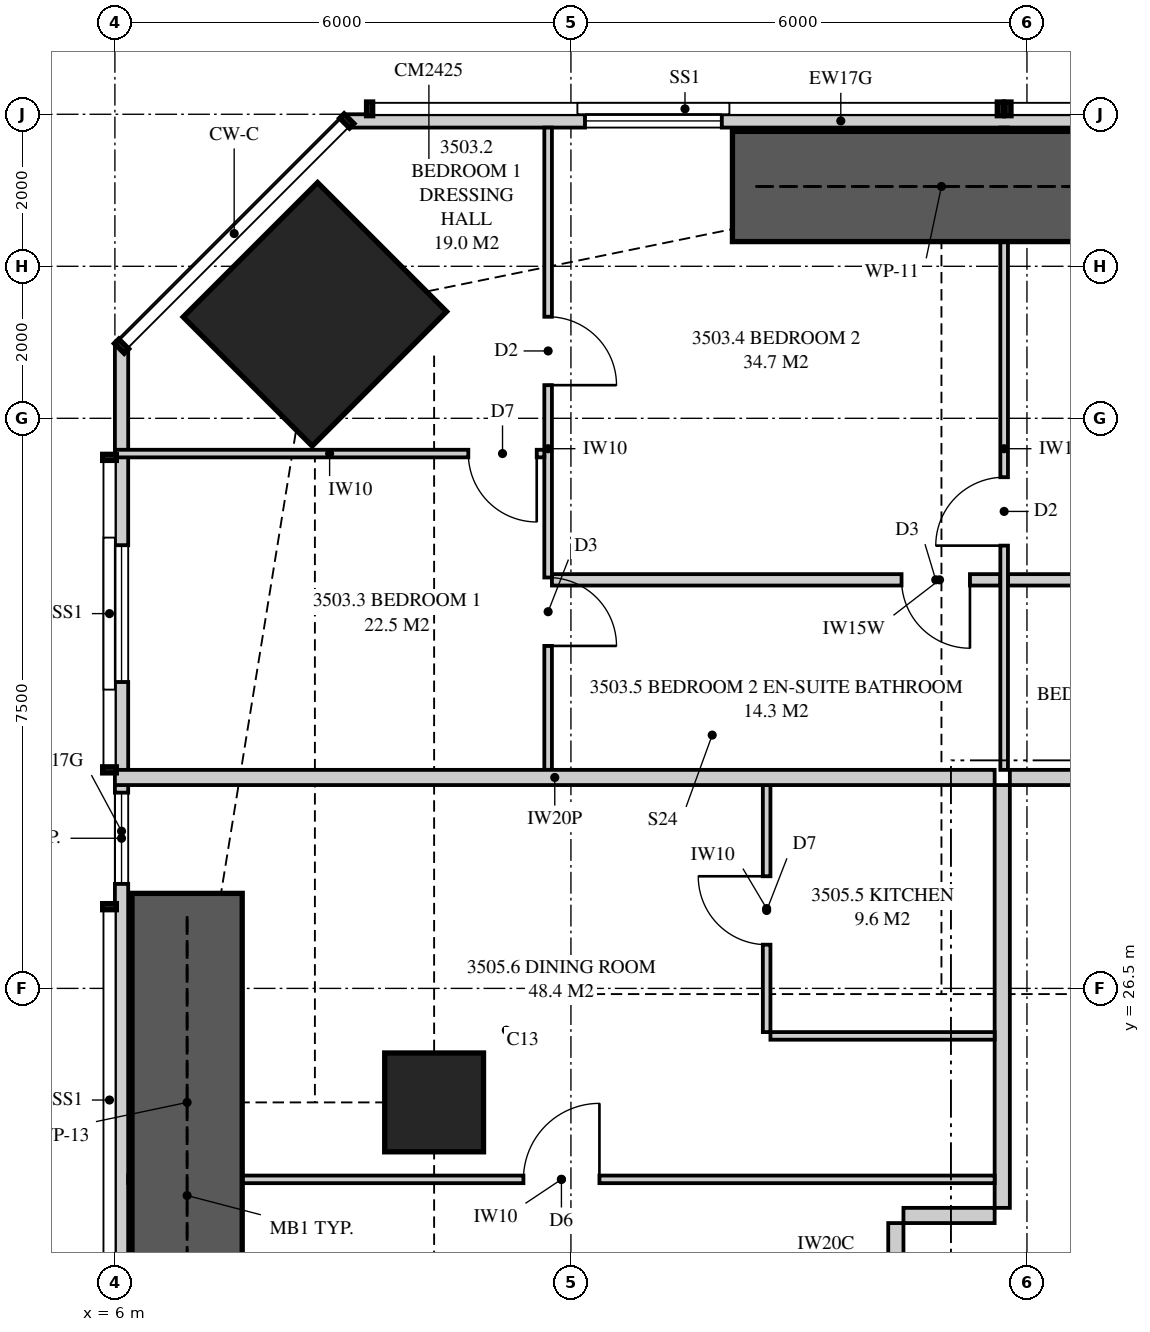
"""IFC4 building model, lengths in metres.
Left out: names, types, materials, properties, quantities, classifications, styles, units other than length and angle.
Written with IfcOpenShell. Run it as: python <this file> out.ifc"""

import sys

from ifc_helpers import new_model, si_unit, direction, frame, frame_2d, origin, origin_2d, place, context, subcontext, project, spatial, polyline, rectangle, outline, extrude, element, fill, save


model = new_model("IFC4")
c1 = context("Model", 3, precision=1e-05, world=origin(), true_north=direction((0.0, 1.0)))
c2 = subcontext(c1, "Body", "Model", "MODEL_VIEW")
j1 = project(units=[si_unit("LENGTHUNIT", "METRE"), si_unit("PLANEANGLEUNIT", "RADIAN")], contexts=[c1])
p1 = place(None, origin())
s1 = spatial("IfcSite", under=j1, at=p1, CompositionType="ELEMENT")
p2 = place(p1, origin())
s2 = spatial("IfcBuilding", under=s1, at=p2, CompositionType="ELEMENT")
p3 = place(p2, frame((0.0, 0.0, 128.3)))
s3 = spatial("IfcBuildingStorey", under=s2, at=p3, CompositionType="ELEMENT", Elevation=128.3)
p4 = place(p3, frame((8.631, 35.369, 0.0), z_axis=(0.0, 0.0, 1.0), x_axis=(0.707106781187, -0.707106781187, 0.0)))
e1 = element("IfcColumn", 1, at=p4, inside=s3, PredefinedType="COLUMN", context=c2, shape_type="SweptSolid", body=[
    extrude(rectangle(XDim=2.4, YDim=2.5, at=origin_2d()), origin(), (0.0, 0.0, 1.0), 3.35),
])
p5 = place(p3, frame((10.2, 25.0, 0.0), z_axis=(0.0, 0.0, 1.0), x_axis=(1.0, 0.0, 0.0)))
e2 = element("IfcColumn", 2, at=p5, inside=s3, PredefinedType="COLUMN", context=c2, shape_type="SweptSolid", body=[
    extrude(rectangle(XDim=1.3, YDim=1.3, at=origin_2d()), origin(), (0.0, 0.0, 1.0), 3.35),
])
p6 = place(p3, frame((22.05, 37.913, 0.0), z_axis=(0.0, 0.0, 1.0), x_axis=(-1.0, 0.0, 0.0)))
e3 = element("IfcWall", 3, at=p6, inside=s3, PredefinedType="SOLIDWALL", context=c2, shape_type="SweptSolid", body=[
    extrude(outline(polyline([(0.0, 0.0), (12.999, 0.0), (12.999, 3.11), (5.378, 3.11), (5.378, 2.15), (5.333, 2.15), (5.333, 3.11), (5.175, 3.11), (5.175, 2.15), (0.0, 2.15), (0.0, 0.0)])), frame((0.0, 0.087, 0.0), z_axis=(0.0, -1.0, 0.0), x_axis=(1.0, 0.0, 0.0)), (0.0, 0.0, 1.0), 0.175),
])
p7 = place(p6, frame((0.492, 0.0, 0.4)))
e4 = element("IfcOpeningElement", 4, at=p7, cuts=e3, PredefinedType="OPENING", context=c2, shape_type="SweptSolid", body=[
    extrude(rectangle(XDim=1.8, YDim=1.7, at=frame_2d((0.9, 0.85))), frame((0.0, 0.097, 0.0), z_axis=(0.0, -1.0, 0.0), x_axis=(1.0, 0.0, 0.0)), (0.0, 0.0, 1.0), 0.195),
])
p8 = place(p6, frame((8.065, 0.0, 0.4)))
e5 = element("IfcOpeningElement", 5, at=p8, cuts=e3, PredefinedType="OPENING", context=c2, shape_type="SweptSolid", body=[
    extrude(rectangle(XDim=1.8, YDim=1.7, at=frame_2d((0.9, 0.85))), frame((0.0, 0.097, 0.0), z_axis=(0.0, -1.0, 0.0), x_axis=(1.0, 0.0, 0.0)), (0.0, 0.0, 1.0), 0.195),
])
p9 = place(p3, frame((6.087, 34.949, 0.0), z_axis=(0.0, 0.0, 1.0), x_axis=(0.0, -1.0, 0.0)))
e6 = element("IfcWall", 6, at=p9, inside=s3, PredefinedType="SOLIDWALL", context=c2, shape_type="SweptSolid", body=[
    extrude(outline(polyline([(0.0, 0.0), (12.761, 0.0), (12.761, 2.15), (9.949, 2.15), (9.949, 3.11), (9.823, 3.11), (9.823, 2.15), (9.73, 2.15), (9.73, 3.11), (0.0, 3.11), (0.0, 0.0)])), frame((0.0, 0.087, 0.0), z_axis=(0.0, -1.0, 0.0), x_axis=(1.0, 0.0, 0.0)), (0.0, 0.0, 1.0), 0.175),
])
p10 = place(p9, frame((2.618, 0.0, 0.4)))
e7 = element("IfcOpeningElement", 7, at=p10, cuts=e6, PredefinedType="OPENING", context=c2, shape_type="SweptSolid", body=[
    extrude(rectangle(XDim=1.8, YDim=1.7, at=frame_2d((0.9, 0.85))), frame((0.0, 0.097, 0.0), z_axis=(0.0, -1.0, 0.0), x_axis=(1.0, 0.0, 0.0)), (0.0, 0.0, 1.0), 0.195),
])
p11 = place(p9, frame((5.874, 0.0, 0.4)))
e8 = element("IfcOpeningElement", 8, at=p11, cuts=e6, PredefinedType="OPENING", context=c2, shape_type="SweptSolid", body=[
    extrude(rectangle(XDim=1.2, YDim=1.7, at=frame_2d((0.6, 0.85))), frame((0.0, 0.097, 0.0), z_axis=(0.0, -1.0, 0.0), x_axis=(1.0, 0.0, 0.0)), (0.0, 0.0, 1.0), 0.195),
])
p12 = place(p3, frame((17.775, 29.275, 0.0), z_axis=(0.0, 0.0, 1.0), x_axis=(1.0, 0.0, 0.0)))
e9 = element("IfcWall", 9, at=p12, inside=s3, PredefinedType="PARTITIONING", context=c2, shape_type="SweptSolid", body=[
    extrude(outline(polyline([(0.0, 0.0), (11.425, 0.0), (11.425, 3.11), (10.312, 3.11), (10.312, 2.541), (9.638, 2.541), (9.638, 3.11), (0.0, 3.11), (0.0, 0.0)])), frame((0.0, 0.1, 0.0), z_axis=(0.0, -1.0, 0.0), x_axis=(1.0, 0.0, 0.0)), (0.0, 0.0, 1.0), 0.2),
])
p13 = place(p12, frame((4.625, 0.0, 0.0)))
e10 = element("IfcOpeningElement", 10, at=p13, cuts=e9, PredefinedType="OPENING", context=c2, shape_type="SweptSolid", body=[
    extrude(rectangle(XDim=1.05, YDim=2.2, at=frame_2d((0.525, 1.1))), frame((0.0, 0.11, 0.0), z_axis=(0.0, -1.0, 0.0), x_axis=(1.0, 0.0, 0.0)), (0.0, 0.0, 1.0), 0.22),
])
p14 = place(p3, frame((11.7, 37.825, 0.0), z_axis=(0.0, 0.0, 1.0), x_axis=(0.0, -1.0, 0.0)))
e11 = element("IfcWall", 11, at=p14, inside=s3, PredefinedType="PARTITIONING", context=c2, shape_type="SweptSolid", body=[
    extrude(outline(polyline([(0.0, 0.0), (8.45, 0.0), (8.45, 3.11), (2.708, 3.11), (2.708, 2.15), (0.953, 2.15), (0.953, 3.11), (0.0, 3.11), (0.0, 0.0)])), frame((0.0, 0.05, 0.0), z_axis=(0.0, -1.0, 0.0), x_axis=(1.0, 0.0, 0.0)), (0.0, 0.0, 1.0), 0.1),
])
p15 = place(p14, frame((2.489, 0.0, 0.0)))
e12 = element("IfcOpeningElement", 12, at=p15, cuts=e11, PredefinedType="OPENING", context=c2, shape_type="SweptSolid", body=[
    extrude(rectangle(XDim=0.9, YDim=2.1, at=frame_2d((0.45, 1.05))), frame((0.0, 0.06, 0.0), z_axis=(0.0, -1.0, 0.0), x_axis=(1.0, 0.0, 0.0)), (0.0, 0.0, 1.0), 0.12),
])
p16 = place(p14, frame((5.919, 0.0, 0.0)))
e13 = element("IfcOpeningElement", 13, at=p16, cuts=e11, PredefinedType="OPENING", context=c2, shape_type="SweptSolid", body=[
    extrude(rectangle(XDim=0.9, YDim=2.1, at=frame_2d((0.45, 1.05))), frame((0.0, 0.06, 0.0), z_axis=(0.0, -1.0, 0.0), x_axis=(1.0, 0.0, 0.0)), (0.0, 0.0, 1.0), 0.12),
])
p17 = place(p3, frame((17.7, 37.825, 0.0), z_axis=(0.0, 0.0, 1.0), x_axis=(0.0, -1.0, 0.0)))
e14 = element("IfcWall", 14, at=p17, inside=s3, PredefinedType="PARTITIONING", context=c2, shape_type="SweptSolid", body=[
    extrude(outline(polyline([(1.635, 2.15), (0.0, 2.15), (0.0, 0.0), (8.45, 0.0), (8.45, 3.11), (1.635, 3.11), (1.635, 2.15)]), holes=[polyline([(1.021, 0.116), (0.529, 0.116), (0.529, 0.906), (1.021, 0.906), (1.021, 0.116)]), polyline([(1.021, 1.244), (0.529, 1.244), (0.529, 2.034), (1.021, 2.034), (1.021, 1.244)])]), frame((0.0, 0.05, 0.0), z_axis=(0.0, -1.0, 0.0), x_axis=(1.0, 0.0, 0.0)), (0.0, 0.0, 1.0), 0.1),
])
p18 = place(p17, frame((4.6, 0.0, 0.0)))
e15 = element("IfcOpeningElement", 15, at=p18, cuts=e14, PredefinedType="OPENING", context=c2, shape_type="SweptSolid", body=[
    extrude(rectangle(XDim=0.9, YDim=2.1, at=frame_2d((0.45, 1.05))), frame((0.0, 0.06, 0.0), z_axis=(0.0, -1.0, 0.0), x_axis=(1.0, 0.0, 0.0)), (0.0, 0.0, 1.0), 0.12),
])
p19 = place(p3, frame((6.0, 33.536, 0.0), z_axis=(0.0, 0.0, 1.0), x_axis=(1.0, 0.0, 0.0)))
e16 = element("IfcWall", 16, at=p19, inside=s3, PredefinedType="PARTITIONING", context=c2, shape_type="SweptSolid", body=[
    extrude(outline(polyline([(0.0, 0.0), (5.65, 0.0), (5.65, 3.11), (5.46, 3.11), (5.46, 2.51), (3.206, 2.51), (3.206, 2.15), (1.463, 2.15), (1.463, 3.11), (0.0, 3.11), (0.0, 0.0)])), frame((0.0, 0.05, 0.0), z_axis=(0.0, -1.0, 0.0), x_axis=(1.0, 0.0, 0.0)), (0.0, 0.0, 1.0), 0.1),
])
p20 = place(p19, frame((4.65, 0.0, 0.0)))
e17 = element("IfcOpeningElement", 17, at=p20, cuts=e16, PredefinedType="OPENING", context=c2, shape_type="SweptSolid", body=[
    extrude(rectangle(XDim=0.9, YDim=2.1, at=frame_2d((0.45, 1.05))), frame((0.0, 0.06, 0.0), z_axis=(0.0, -1.0, 0.0), x_axis=(1.0, 0.0, 0.0)), (0.0, 0.0, 1.0), 0.12),
])
p21 = place(p3, frame((11.75, 31.875, 0.0), z_axis=(0.0, 0.0, 1.0), x_axis=(1.0, 0.0, 0.0)))
e18 = element("IfcWall", 18, at=p21, inside=s3, PredefinedType="PLUMBINGWALL", context=c2, shape_type="SweptSolid", body=[
    extrude(outline(polyline([(0.0, 0.0), (5.9, 0.0), (5.9, 3.11), (5.438, 3.11), (5.438, 2.541), (4.812, 2.541), (4.812, 3.11), (0.0, 3.11), (0.0, 0.0)])), frame((0.0, 0.075, 0.0), z_axis=(0.0, -1.0, 0.0), x_axis=(1.0, 0.0, 0.0)), (0.0, 0.0, 1.0), 0.15),
])
p22 = place(p21, frame((4.6, 0.0, 0.0)))
e19 = element("IfcOpeningElement", 19, at=p22, cuts=e18, PredefinedType="OPENING", context=c2, shape_type="SweptSolid", body=[
    extrude(rectangle(XDim=0.9, YDim=2.1, at=frame_2d((0.45, 1.05))), frame((0.0, 0.085, 0.0), z_axis=(0.0, -1.0, 0.0), x_axis=(1.0, 0.0, 0.0)), (0.0, 0.0, 1.0), 0.17),
])
p23 = place(p3, frame((17.75, 31.875, 0.0), z_axis=(0.0, 0.0, 1.0), x_axis=(1.0, 0.0, 0.0)))
e20 = element("IfcWall", 20, at=p23, inside=s3, PredefinedType="PLUMBINGWALL", context=c2, shape_type="SweptSolid", body=[
    extrude(rectangle(XDim=4.2, YDim=0.15, at=frame_2d((2.1, 0.0))), origin(), (0.0, 0.0, 1.0), 3.11),
])
p24 = place(p23, frame((2.9, 0.0, 0.0)))
e21 = element("IfcOpeningElement", 21, at=p24, cuts=e20, PredefinedType="OPENING", context=c2, shape_type="SweptSolid", body=[
    extrude(rectangle(XDim=0.9, YDim=2.1, at=frame_2d((0.45, 1.05))), frame((0.0, 0.085, 0.0), z_axis=(0.0, -1.0, 0.0), x_axis=(1.0, 0.0, 0.0)), (0.0, 0.0, 1.0), 0.17),
])
p25 = place(p3, frame((6.0, 29.275, 0.0), z_axis=(0.0, 0.0, 1.0), x_axis=(1.0, 0.0, 0.0)))
e22 = element("IfcWall", 22, at=p25, inside=s3, PredefinedType="PARTITIONING", context=c2, shape_type="SweptSolid", body=[
    extrude(outline(polyline([(0.0, 0.0), (11.575, 0.0), (11.575, 3.11), (11.212, 3.11), (11.212, 2.541), (10.538, 2.541), (10.538, 3.11), (5.51, 3.11), (5.51, 2.51), (2.969, 2.51), (2.969, 2.541), (2.565, 2.541), (2.565, 2.15), (0.721, 2.15), (0.721, 3.11), (0.0, 3.11), (0.0, 0.0)])), frame((0.0, 0.1, 0.0), z_axis=(0.0, -1.0, 0.0), x_axis=(1.0, 0.0, 0.0)), (0.0, 0.0, 1.0), 0.2),
])
p26 = place(p3, frame((14.575, 25.925, 0.0), z_axis=(0.0, 0.0, 1.0), x_axis=(0.0, 1.0, 0.0)))
e23 = element("IfcWall", 23, at=p26, inside=s3, PredefinedType="PARTITIONING", context=c2, shape_type="SweptSolid", body=[
    extrude(outline(polyline([(0.0, 0.0), (3.25, 0.0), (3.25, 3.11), (0.787, 3.11), (0.787, 2.541), (0.213, 2.541), (0.213, 3.11), (0.0, 3.11), (0.0, 0.0)])), frame((0.0, 0.05, 0.0), z_axis=(0.0, -1.0, 0.0), x_axis=(1.0, 0.0, 0.0)), (0.0, 0.0, 1.0), 0.1),
])
p27 = place(p26, frame((1.15, 0.0, 0.0)))
e24 = element("IfcOpeningElement", 24, at=p27, cuts=e23, PredefinedType="OPENING", context=c2, shape_type="SweptSolid", body=[
    extrude(rectangle(XDim=0.9, YDim=2.1, at=frame_2d((0.45, 1.05))), frame((0.0, 0.06, 0.0), z_axis=(0.0, -1.0, 0.0), x_axis=(1.0, 0.0, 0.0)), (0.0, 0.0, 1.0), 0.12),
])
p28 = place(p3, frame((14.625, 25.875, 0.0), z_axis=(0.0, 0.0, 1.0), x_axis=(1.0, 0.0, 0.0)))
e25 = element("IfcWall", 25, at=p28, inside=s3, PredefinedType="PARTITIONING", context=c2, shape_type="SweptSolid", body=[
    extrude(rectangle(XDim=2.95, YDim=0.1, at=frame_2d((1.475, 0.0))), origin(), (0.0, 0.0, 1.0), 3.11),
])
p29 = place(p3, frame((6.175, 23.988, 0.0), z_axis=(0.0, 0.0, 1.0), x_axis=(1.0, 0.0, 0.0)))
e26 = element("IfcWall", 26, at=p29, inside=s3, PredefinedType="PARTITIONING", context=c2, shape_type="SweptSolid", body=[
    extrude(outline(polyline([(0.529, 2.15), (0.0, 2.15), (0.0, 0.0), (0.529, 0.0), (0.529, 0.778), (1.021, 0.778), (1.021, 0.0), (11.4, 0.0), (11.4, 3.11), (5.285, 3.11), (5.285, 2.51), (2.765, 2.51), (2.765, 3.11), (1.635, 3.11), (1.635, 2.15), (1.021, 2.15), (1.021, 1.372), (0.529, 1.372), (0.529, 2.15)])), frame((0.0, 0.05, 0.0), z_axis=(0.0, -1.0, 0.0), x_axis=(1.0, 0.0, 0.0)), (0.0, 0.0, 1.0), 0.1),
])
p30 = place(p29, frame((5.2, 0.0, 0.0)))
e27 = element("IfcOpeningElement", 27, at=p30, cuts=e26, PredefinedType="OPENING", context=c2, shape_type="SweptSolid", body=[
    extrude(rectangle(XDim=1.0, YDim=2.1, at=frame_2d((0.5, 1.05))), frame((0.0, 0.06, 0.0), z_axis=(0.0, -1.0, 0.0), x_axis=(1.0, 0.0, 0.0)), (0.0, 0.0, 1.0), 0.12),
])
p31 = place(p3, frame((17.675, 23.613, 0.0), z_axis=(0.0, 0.0, 1.0), x_axis=(0.0, 1.0, 0.0)))
e28 = element("IfcWall", 28, at=p31, inside=s3, PredefinedType="PARTITIONING", context=c2, shape_type="SweptSolid", body=[
    extrude(outline(polyline([(0.0, 0.0), (5.562, 0.0), (5.562, 3.11), (3.15, 3.11), (3.15, 2.541), (2.475, 2.541), (2.475, 3.11), (0.0, 3.11), (0.0, 0.0)])), frame((0.0, 0.1, 0.0), z_axis=(0.0, -1.0, 0.0), x_axis=(1.0, 0.0, 0.0)), (0.0, 0.0, 1.0), 0.2),
])
p32 = place(p3, frame((16.275, 21.012, 0.0), z_axis=(0.0, 0.0, 1.0), x_axis=(0.0, 1.0, 0.0)))
e29 = element("IfcWall", 29, at=p32, inside=s3, PredefinedType="PARTITIONING", context=c2, shape_type="SweptSolid", body=[
    extrude(rectangle(XDim=2.4, YDim=0.2, at=frame_2d((1.2, 0.0))), origin(), (0.0, 0.0, 1.0), 3.11),
])
p33 = place(p32, frame((0.7, 0.0, 0.0)))
e30 = element("IfcOpeningElement", 30, at=p33, cuts=e29, PredefinedType="OPENING", context=c2, shape_type="SweptSolid", body=[
    extrude(rectangle(XDim=1.05, YDim=2.2, at=frame_2d((0.525, 1.1))), frame((0.0, 0.11, 0.0), z_axis=(0.0, -1.0, 0.0), x_axis=(1.0, 0.0, 0.0)), (0.0, 0.0, 1.0), 0.22),
])
p34 = place(p3, frame((17.575, 23.512, 0.0), z_axis=(0.0, 0.0, 1.0), x_axis=(-1.0, 0.0, 0.0)))
e31 = element("IfcWall", 31, at=p34, inside=s3, PredefinedType="PARTITIONING", context=c2, shape_type="SweptSolid", body=[
    extrude(rectangle(XDim=1.2, YDim=0.2, at=frame_2d((0.6, 0.0))), origin(), (0.0, 0.0, 1.0), 3.11),
])
for number, where, z_axis, x_axis in (
    (32, (14.125, 37.05, 0.0), (0.0, 0.0, 1.0), (1.0, 0.0, 0.0)),
    (33, (6.95, 22.25, 0.0), (0.0, 0.0, 1.0), (0.0, 1.0, 0.0)),
):
    element("IfcWall", number, at=place(p3, frame(where, z_axis=z_axis, x_axis=x_axis)), inside=s3, PredefinedType="SHEAR", context=c2, shape_type="SweptSolid", body=[
        extrude(rectangle(XDim=5.5, YDim=1.45, at=frame_2d((2.75, 0.0))), origin(), (0.0, 0.0, 1.0), 3.35),
    ])
p35 = place(p8, origin())
e34 = element("IfcWindow", 34, at=p35, inside=s3, PartitioningType="SINGLE_PANEL", PredefinedType="WINDOW", context=c2, shape_type="SweptSolid", body=[
    extrude(rectangle(XDim=1.8, YDim=1.7, at=frame_2d((0.9, 0.85))), frame((0.0, 0.03, 0.0), z_axis=(0.0, -1.0, 0.0), x_axis=(1.0, 0.0, 0.0)), (0.0, 0.0, 1.0), 0.06),
])
fill(e5, e34)
p36 = place(p10, origin())
e35 = element("IfcWindow", 35, at=p36, inside=s3, PartitioningType="SINGLE_PANEL", PredefinedType="WINDOW", context=c2, shape_type="SweptSolid", body=[
    extrude(rectangle(XDim=1.8, YDim=1.7, at=frame_2d((0.9, 0.85))), frame((0.0, 0.03, 0.0), z_axis=(0.0, -1.0, 0.0), x_axis=(1.0, 0.0, 0.0)), (0.0, 0.0, 1.0), 0.06),
])
fill(e7, e35)
p37 = place(p11, origin())
e36 = element("IfcWindow", 36, at=p37, inside=s3, PartitioningType="SINGLE_PANEL", PredefinedType="WINDOW", context=c2, shape_type="SweptSolid", body=[
    extrude(rectangle(XDim=1.2, YDim=1.7, at=frame_2d((0.6, 0.85))), frame((0.0, 0.03, 0.0), z_axis=(0.0, -1.0, 0.0), x_axis=(1.0, 0.0, 0.0)), (0.0, 0.0, 1.0), 0.06),
])
fill(e8, e36)
p38 = place(p20, frame((0.9, 0.0, 0.0), z_axis=(0.0, 0.0, 1.0), x_axis=(-1.0, 0.0, 0.0)))
e37 = element("IfcDoor", 37, at=p38, inside=s3, OperationType="SINGLE_SWING_LEFT", PredefinedType="DOOR", context=c2, shape_type="SweptSolid", body=[
    extrude(rectangle(XDim=0.9, YDim=2.1, at=frame_2d((0.45, 1.05))), frame((0.0, 0.025, 0.0), z_axis=(0.0, -1.0, 0.0), x_axis=(1.0, 0.0, 0.0)), (0.0, 0.0, 1.0), 0.05),
])
fill(e17, e37)
p39 = place(p15, origin())
e38 = element("IfcDoor", 38, at=p39, inside=s3, OperationType="SINGLE_SWING_RIGHT", PredefinedType="DOOR", context=c2, shape_type="SweptSolid", body=[
    extrude(rectangle(XDim=0.9, YDim=2.1, at=frame_2d((0.45, 1.05))), frame((0.0, 0.025, 0.0), z_axis=(0.0, -1.0, 0.0), x_axis=(1.0, 0.0, 0.0)), (0.0, 0.0, 1.0), 0.05),
])
fill(e12, e38)
p40 = place(p18, frame((0.9, 0.0, 0.0), z_axis=(0.0, 0.0, 1.0), x_axis=(-1.0, 0.0, 0.0)))
e39 = element("IfcDoor", 39, at=p40, inside=s3, OperationType="SINGLE_SWING_LEFT", PredefinedType="DOOR", context=c2, shape_type="SweptSolid", body=[
    extrude(rectangle(XDim=0.9, YDim=2.1, at=frame_2d((0.45, 1.05))), frame((0.0, 0.025, 0.0), z_axis=(0.0, -1.0, 0.0), x_axis=(1.0, 0.0, 0.0)), (0.0, 0.0, 1.0), 0.05),
])
fill(e15, e39)
p41 = place(p22, frame((0.9, 0.0, 0.0), z_axis=(0.0, 0.0, 1.0), x_axis=(-1.0, 0.0, 0.0)))
e40 = element("IfcDoor", 40, at=p41, inside=s3, OperationType="SINGLE_SWING_LEFT", PredefinedType="DOOR", context=c2, shape_type="SweptSolid", body=[
    extrude(rectangle(XDim=0.9, YDim=2.1, at=frame_2d((0.45, 1.05))), frame((0.0, 0.025, 0.0), z_axis=(0.0, -1.0, 0.0), x_axis=(1.0, 0.0, 0.0)), (0.0, 0.0, 1.0), 0.05),
])
fill(e19, e40)
p42 = place(p16, origin())
e41 = element("IfcDoor", 41, at=p42, inside=s3, OperationType="SINGLE_SWING_RIGHT", PredefinedType="DOOR", context=c2, shape_type="SweptSolid", body=[
    extrude(rectangle(XDim=0.9, YDim=2.1, at=frame_2d((0.45, 1.05))), frame((0.0, 0.025, 0.0), z_axis=(0.0, -1.0, 0.0), x_axis=(1.0, 0.0, 0.0)), (0.0, 0.0, 1.0), 0.05),
])
fill(e13, e41)
p43 = place(p27, origin())
e42 = element("IfcDoor", 42, at=p43, inside=s3, OperationType="SINGLE_SWING_RIGHT", PredefinedType="DOOR", context=c2, shape_type="SweptSolid", body=[
    extrude(rectangle(XDim=0.9, YDim=2.1, at=frame_2d((0.45, 1.05))), frame((0.0, 0.025, 0.0), z_axis=(0.0, -1.0, 0.0), x_axis=(1.0, 0.0, 0.0)), (0.0, 0.0, 1.0), 0.05),
])
fill(e24, e42)
p44 = place(p30, origin())
e43 = element("IfcDoor", 43, at=p44, inside=s3, OperationType="SINGLE_SWING_RIGHT", PredefinedType="DOOR", context=c2, shape_type="SweptSolid", body=[
    extrude(rectangle(XDim=1.0, YDim=2.1, at=frame_2d((0.5, 1.05))), frame((0.0, 0.025, 0.0), z_axis=(0.0, -1.0, 0.0), x_axis=(1.0, 0.0, 0.0)), (0.0, 0.0, 1.0), 0.05),
])
fill(e27, e43)
save(model, sys.argv[1])
